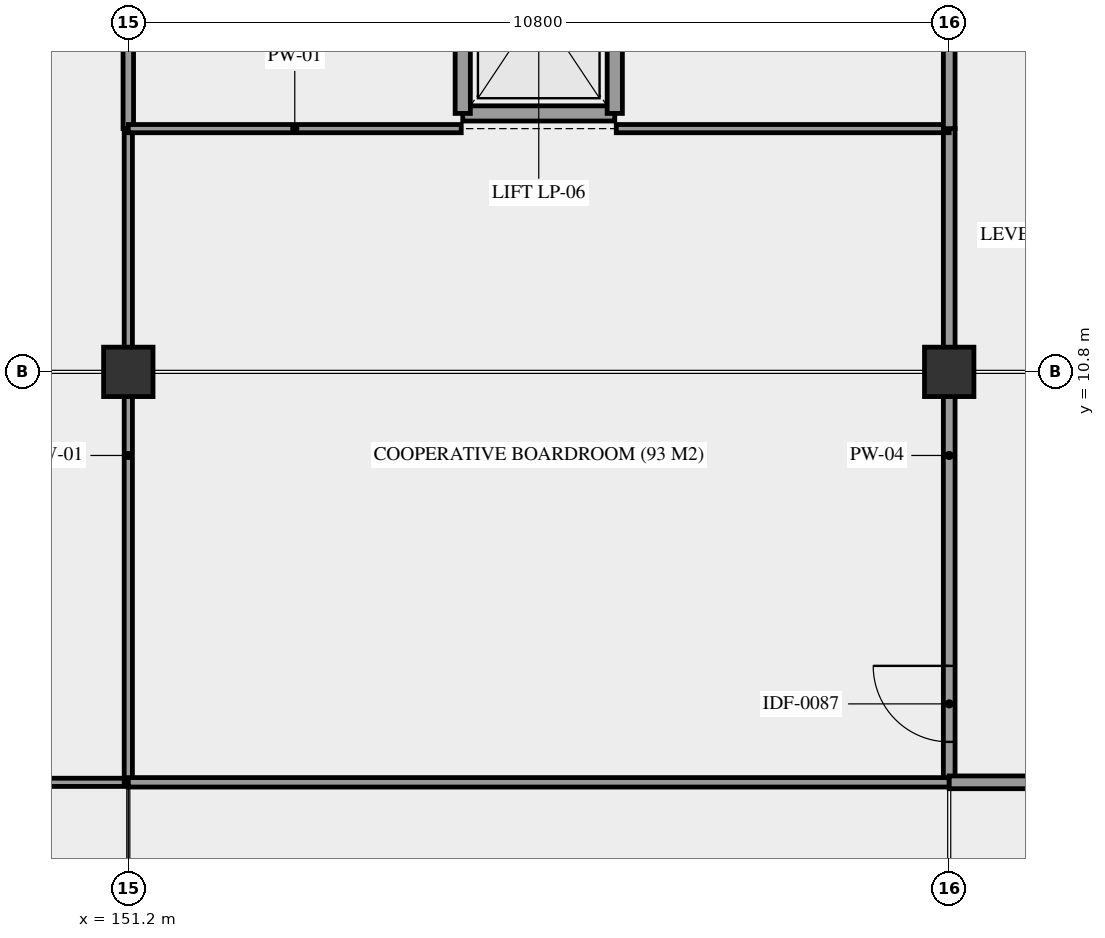
"""IFC4 building model, lengths in metres.
Left out: names, types, materials, properties, quantities, classifications, styles, units other than length and angle.
Written with IfcOpenShell. Run it as: python <this file> out.ifc"""

import sys

from ifc_helpers import new_model, si_unit, direction, frame, frame_2d, origin, origin_2d, place, context, subcontext, project, spatial, rectangle, extrude, element, fill, save


model = new_model("IFC4")
c1 = context("Model", 3, precision=1e-05, world=origin(), true_north=direction((0.0, 1.0)))
c2 = subcontext(c1, "Body", "Model", "MODEL_VIEW")
j1 = project(units=[si_unit("LENGTHUNIT", "METRE"), si_unit("PLANEANGLEUNIT", "RADIAN")], contexts=[c1])
p1 = place(None, origin())
s1 = spatial("IfcSite", under=j1, at=p1, CompositionType="ELEMENT")
p2 = place(p1, origin())
s2 = spatial("IfcBuilding", under=s1, at=p2, CompositionType="ELEMENT")
p3 = place(p2, frame((0.0, 0.0, 10.08)))
s3 = spatial("IfcBuildingStorey", under=s2, at=p3, CompositionType="ELEMENT", Elevation=10.08)
for number, where, z_axis, x_axis in (
    (1, (151.2, 10.8, 0.0), (0.0, 0.0, 1.0), (1.0, 0.0, 0.0)),
    (2, (162.0, 10.8, 0.0), (0.0, 0.0, 1.0), (1.0, 0.0, 0.0)),
):
    element("IfcColumn", number, at=place(p3, frame(where, z_axis=z_axis, x_axis=x_axis)), inside=s3, PredefinedType="COLUMN", context=c2, shape_type="SweptSolid", body=[
        extrude(rectangle(XDim=0.65, YDim=0.65, at=origin_2d()), origin(), (0.0, 0.0, 1.0), 4.68),
    ])
p4 = place(p3, frame((155.6, 14.2, 0.0), z_axis=(0.0, 0.0, 1.0), x_axis=(1.0, 0.0, 0.0)))
e3 = element("IfcWall", 3, at=p4, inside=s3, PredefinedType="SOLIDWALL", context=c2, shape_type="SweptSolid", body=[
    extrude(rectangle(XDim=2.0, YDim=0.2, at=frame_2d((1.0, 0.0))), origin(), (0.0, 0.0, 1.0), 3.5),
])
for number, where, z_axis, x_axis in (
    (4, (155.6, 14.2, 0.0), (0.0, 0.0, 1.0), (0.0, 1.0, 0.0)),
    (5, (157.6, 14.2, 0.0), (0.0, 0.0, 1.0), (0.0, 1.0, 0.0)),
):
    element("IfcWall", number, at=place(p3, frame(where, z_axis=z_axis, x_axis=x_axis)), inside=s3, PredefinedType="SOLIDWALL", context=c2, shape_type="SweptSolid", body=[
        extrude(rectangle(XDim=2.8, YDim=0.2, at=frame_2d((1.4, 0.0))), origin(), (0.0, 0.0, 1.0), 3.5),
    ])
p5 = place(p3, frame((162.0, 5.4, 0.0), z_axis=(0.0, 0.0, 1.0), x_axis=(0.0, 1.0, 0.0)))
e6 = element("IfcWall", 6, at=p5, inside=s3, PredefinedType="PARTITIONING", context=c2, shape_type="SweptSolid", body=[
    extrude(rectangle(XDim=8.6, YDim=0.154, at=frame_2d((4.3, 0.0))), origin(), (0.0, 0.0, 1.0), 3.23),
])
p6 = place(p5, frame((0.532, 0.0, 0.0)))
e7 = element("IfcOpeningElement", 7, at=p6, cuts=e6, PredefinedType="OPENING", context=c2, shape_type="SweptSolid", body=[
    extrude(rectangle(XDim=1.0, YDim=2.15, at=frame_2d((0.5, 1.075))), frame((0.0, 0.087, 0.0), z_axis=(0.0, -1.0, 0.0), x_axis=(1.0, 0.0, 0.0)), (0.0, 0.0, 1.0), 0.174),
])
p7 = place(p3, frame((149.27, 5.4, 0.0), z_axis=(0.0, 0.0, 1.0), x_axis=(1.0, 0.0, 0.0)))
e8 = element("IfcWall", 8, at=p7, inside=s3, PredefinedType="PARTITIONING", context=c2, shape_type="SweptSolid", body=[
    extrude(rectangle(XDim=1.93, YDim=0.108, at=frame_2d((0.965, 0.0))), origin(), (0.0, 0.0, 1.0), 3.23),
])
p8 = place(p3, frame((151.2, 5.4, 0.0), z_axis=(0.0, 0.0, 1.0), x_axis=(0.0, 1.0, 0.0)))
e9 = element("IfcWall", 9, at=p8, inside=s3, PredefinedType="PARTITIONING", context=c2, shape_type="SweptSolid", body=[
    extrude(rectangle(XDim=8.6, YDim=0.108, at=frame_2d((4.3, 0.0))), origin(), (0.0, 0.0, 1.0), 3.23),
])
p9 = place(p3, frame((151.2, 5.4, 0.0), z_axis=(0.0, 0.0, 1.0), x_axis=(1.0, 0.0, 0.0)))
e10 = element("IfcWall", 10, at=p9, inside=s3, PredefinedType="PARTITIONING", context=c2, shape_type="SweptSolid", body=[
    extrude(rectangle(XDim=10.8, YDim=0.124, at=frame_2d((5.4, 0.0))), origin(), (0.0, 0.0, 1.0), 3.23),
])
p10 = place(p3, frame((151.2, 14.0, 0.0), z_axis=(0.0, 0.0, 1.0), x_axis=(0.0, 1.0, 0.0)))
e11 = element("IfcWall", 11, at=p10, inside=s3, PredefinedType="PARTITIONING", context=c2, shape_type="SweptSolid", body=[
    extrude(rectangle(XDim=3.2, YDim=0.138, at=frame_2d((1.6, 0.0))), origin(), (0.0, 0.0, 1.0), 3.23),
])
p11 = place(p3, frame((151.2, 14.0, 0.0), z_axis=(0.0, 0.0, 1.0), x_axis=(1.0, 0.0, 0.0)))
e12 = element("IfcWall", 12, at=p11, inside=s3, PredefinedType="PARTITIONING", context=c2, shape_type="SweptSolid", body=[
    extrude(rectangle(XDim=4.38, YDim=0.108, at=frame_2d((2.19, 0.0))), origin(), (0.0, 0.0, 1.0), 3.23),
])
p12 = place(p3, frame((157.62, 14.0, 0.0), z_axis=(0.0, 0.0, 1.0), x_axis=(1.0, 0.0, 0.0)))
e13 = element("IfcWall", 13, at=p12, inside=s3, PredefinedType="PARTITIONING", context=c2, shape_type="SweptSolid", body=[
    extrude(rectangle(XDim=4.38, YDim=0.108, at=frame_2d((2.19, 0.0))), origin(), (0.0, 0.0, 1.0), 3.23),
])
p13 = place(p3, frame((162.0, 5.4, 0.0), z_axis=(0.0, 0.0, 1.0), x_axis=(1.0, 0.0, 0.0)))
e14 = element("IfcWall", 14, at=p13, inside=s3, PredefinedType="PARTITIONING", context=c2, shape_type="SweptSolid", body=[
    extrude(rectangle(XDim=1.33, YDim=0.168, at=frame_2d((0.665, 0.0))), origin(), (0.0, 0.0, 1.0), 3.23),
])
p14 = place(p3, frame((162.0, 14.0, 0.0), z_axis=(0.0, 0.0, 1.0), x_axis=(0.0, 1.0, 0.0)))
e15 = element("IfcWall", 15, at=p14, inside=s3, PredefinedType="PARTITIONING", context=c2, shape_type="SweptSolid", body=[
    extrude(rectangle(XDim=3.2, YDim=0.154, at=frame_2d((1.6, 0.0))), origin(), (0.0, 0.0, 1.0), 3.23),
])
p15 = place(p6, frame((1.0, 0.0, 0.0), z_axis=(0.0, 0.0, 1.0), x_axis=(-1.0, 0.0, 0.0)))
e16 = element("IfcDoor", 16, at=p15, inside=s3, OperationType="SINGLE_SWING_RIGHT", PredefinedType="DOOR", context=c2, shape_type="SweptSolid", body=[
    extrude(rectangle(XDim=1.0, YDim=2.15, at=frame_2d((0.5, 1.075))), frame((0.0, 0.025, 0.0), z_axis=(0.0, -1.0, 0.0), x_axis=(1.0, 0.0, 0.0)), (0.0, 0.0, 1.0), 0.05),
])
fill(e7, e16)
save(model, sys.argv[1])
